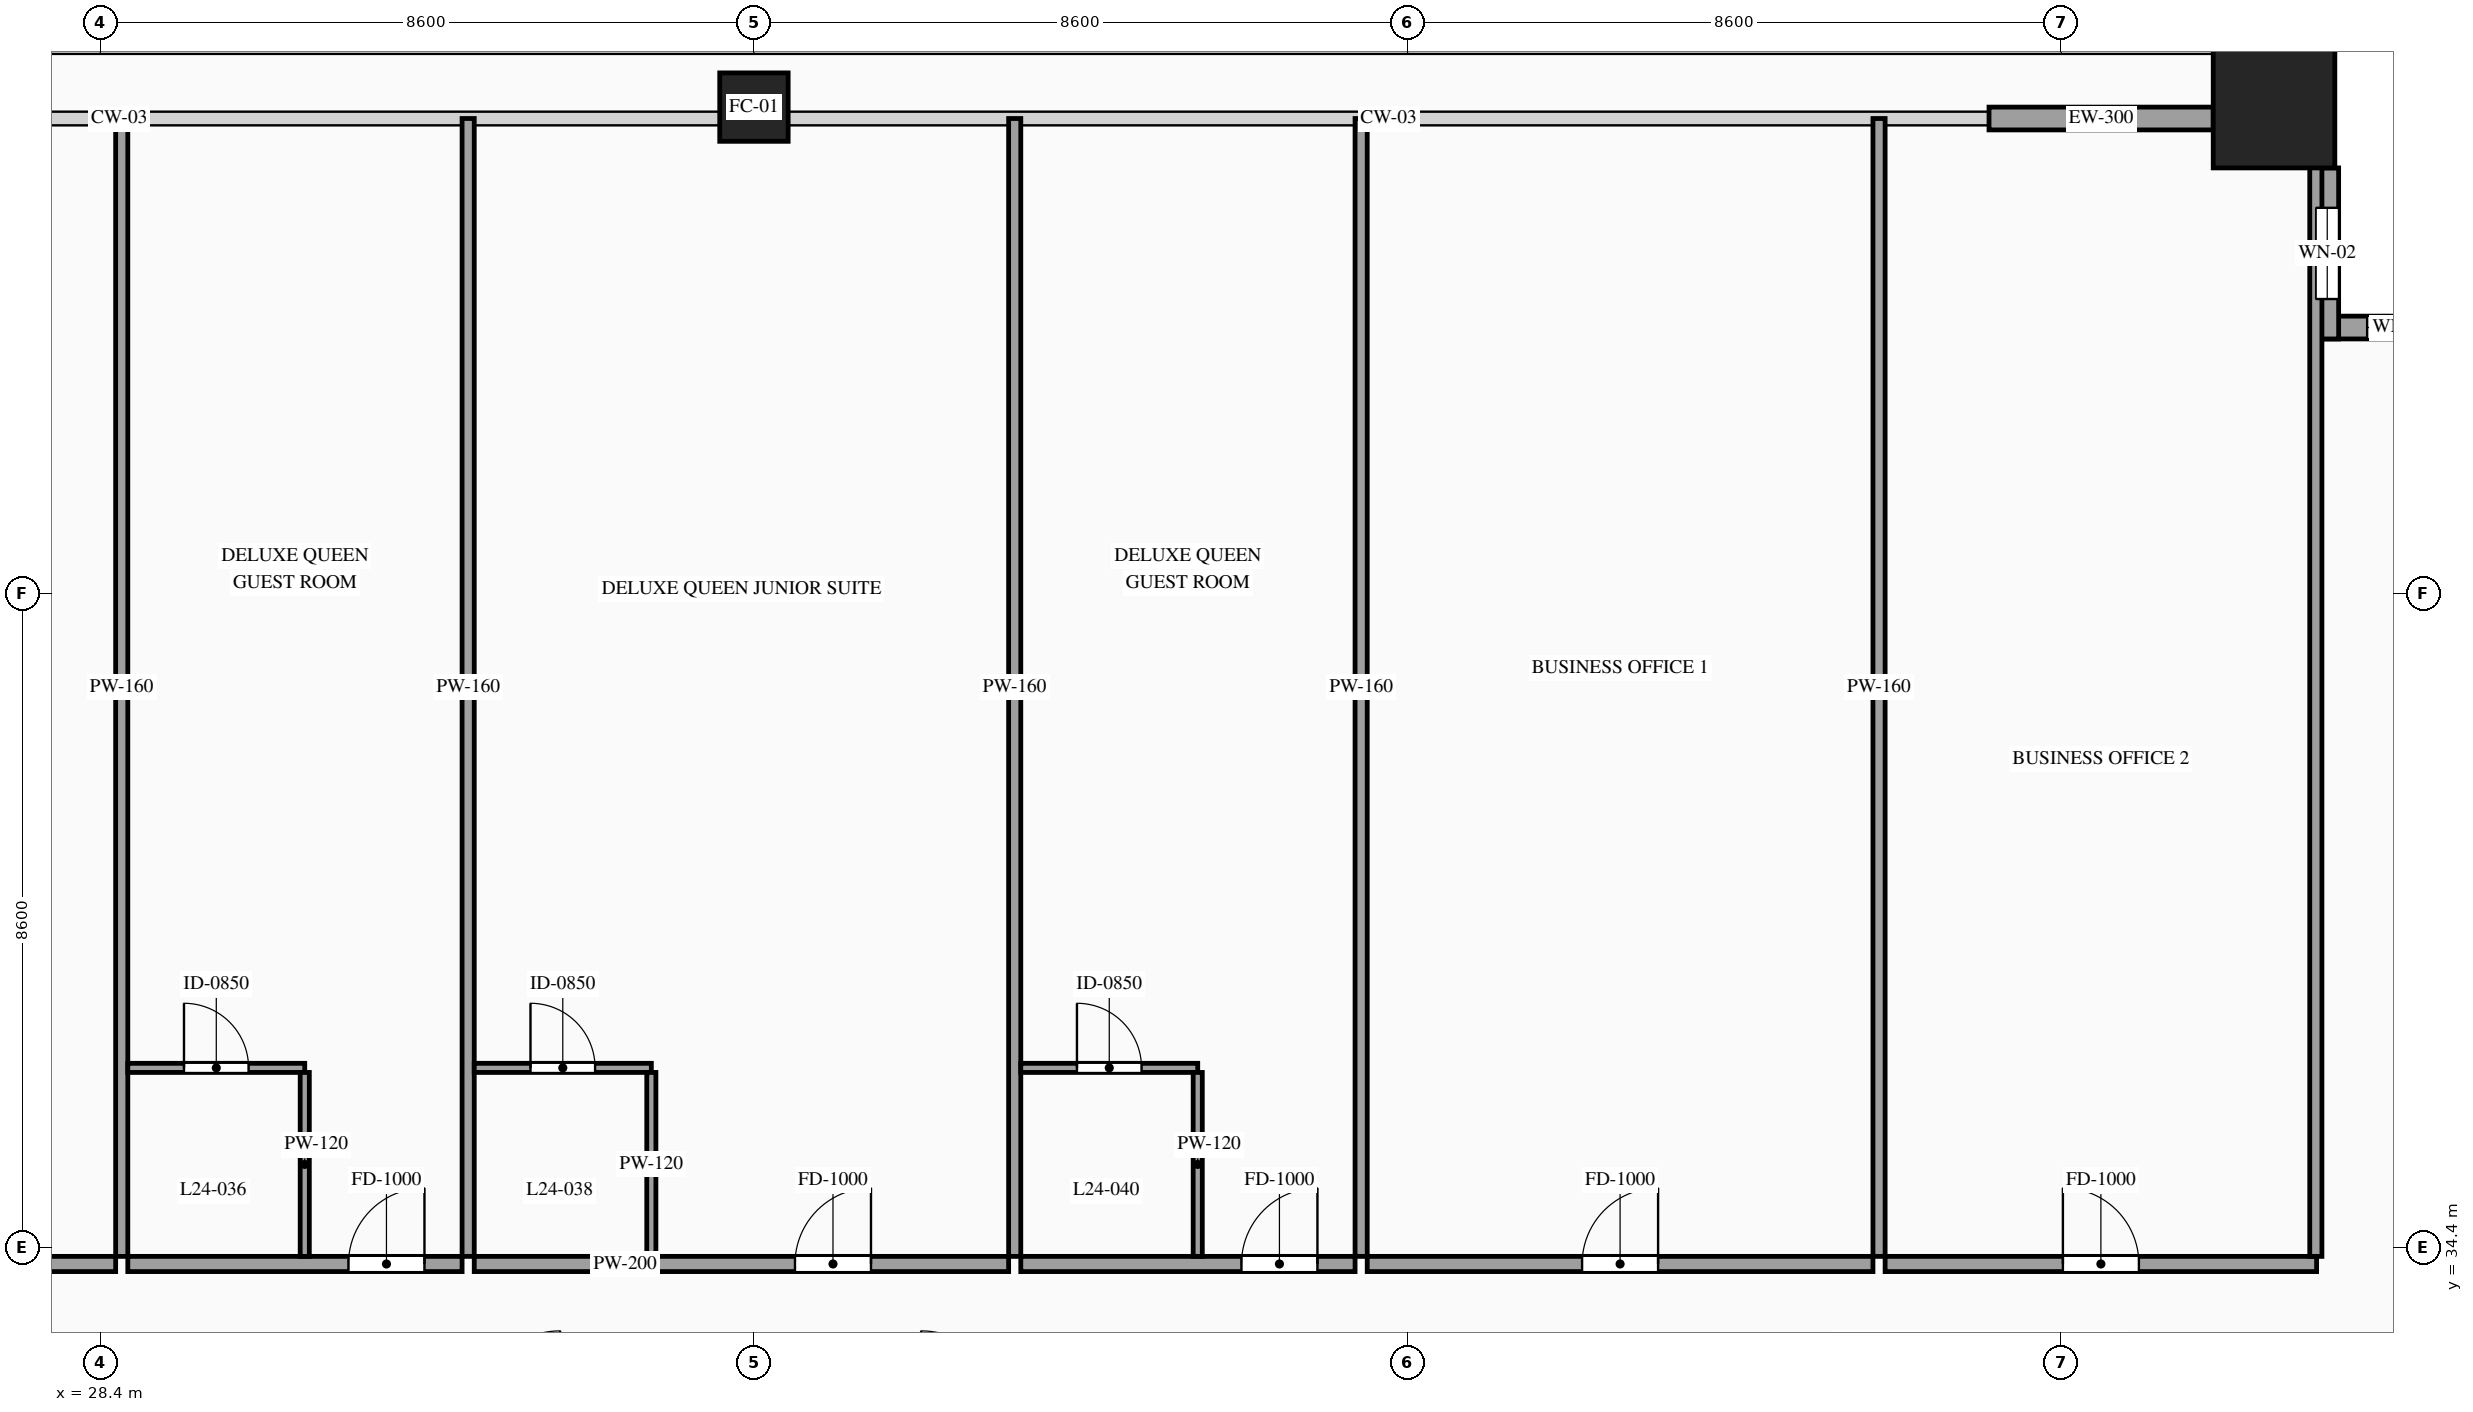
"""IFC4 building model, lengths in metres.
Left out: names, types, materials, properties, quantities, classifications, styles, units other than length and angle.
Written with IfcOpenShell. Run it as: python <this file> out.ifc"""

import sys

from ifc_helpers import new_model, si_unit, direction, frame, frame_2d, origin, origin_2d, place, context, subcontext, project, spatial, rectangle, hollow_rectangle, extrude, source, transform, mapped, element, fill, save


model = new_model("IFC4")
c1 = context("Model", 3, precision=1e-05, world=origin(), true_north=direction((0.0, 1.0)))
c2 = subcontext(c1, "Body", "Model", "MODEL_VIEW")
j1 = project(units=[si_unit("LENGTHUNIT", "METRE"), si_unit("PLANEANGLEUNIT", "RADIAN")], contexts=[c1])
p1 = place(None, origin())
s1 = spatial("IfcSite", under=j1, at=p1, CompositionType="ELEMENT")
p2 = place(p1, origin())
s2 = spatial("IfcBuilding", under=s1, at=p2, CompositionType="ELEMENT")
p3 = place(p2, frame((0.0, 0.0, 93.8)))
s3 = spatial("IfcBuildingStorey", under=s2, at=p3, CompositionType="ELEMENT", Elevation=93.8)
m1 = source(origin(), c2, "Body", "SweptSolid", [
    extrude(hollow_rectangle(XDim=0.9, YDim=0.9, WallThickness=0.042, at=origin_2d()), origin(), (0.0, 0.0, 1.0), 3.6),
])
p4 = place(p3, frame((37.0, 49.4, 0.0), z_axis=(0.0, 0.0, 1.0), x_axis=(1.0, 0.0, 0.0)))
e1 = element("IfcColumn", 1, at=p4, inside=s3, PredefinedType="COLUMN", context=c2, shape_type="MappedRepresentation", body=[
    mapped(m1, transform((0.0, 0.0, 0.0), scale=1.0)),
])
m2 = source(origin(), c2, "Body", "SweptSolid", [
    extrude(hollow_rectangle(XDim=1.6, YDim=1.6, WallThickness=0.07, at=origin_2d()), origin(), (0.0, 0.0, 1.0), 3.6),
])
p5 = place(p3, frame((57.0, 49.4, 0.0), z_axis=(0.0, 0.0, 1.0), x_axis=(1.0, 0.0, 0.0)))
e2 = element("IfcColumn", 2, at=p5, inside=s3, PredefinedType="COLUMN", context=c2, shape_type="MappedRepresentation", body=[
    mapped(m2, transform((0.0, 0.0, 0.0), scale=1.0)),
])
p6 = place(p3, frame((59.8, 46.5, 0.0), z_axis=(0.0, 0.0, 1.0), x_axis=(-1.0, 0.0, 0.0)))
e3 = element("IfcWall", 3, at=p6, inside=s3, PredefinedType="SOLIDWALL", context=c2, shape_type="SweptSolid", body=[
    extrude(rectangle(XDim=2.25, YDim=0.3, at=frame_2d((1.125, 0.0))), origin(), (0.0, 0.0, 1.0), 3.38),
])
p7 = place(p6, frame((0.675, 0.0, 0.85)))
e4 = element("IfcOpeningElement", 4, at=p7, cuts=e3, PredefinedType="OPENING", context=c2, shape_type="SweptSolid", body=[
    extrude(rectangle(XDim=0.9, YDim=1.5, at=frame_2d((0.45, 0.75))), frame((0.0, 0.165, 0.0), z_axis=(0.0, -1.0, 0.0), x_axis=(1.0, 0.0, 0.0)), (0.0, 0.0, 1.0), 0.33),
])
p8 = place(p3, frame((57.7, 46.35, 0.0), z_axis=(0.0, 0.0, 1.0), x_axis=(0.0, 1.0, 0.0)))
e5 = element("IfcWall", 5, at=p8, inside=s3, PredefinedType="SOLIDWALL", context=c2, shape_type="SweptSolid", body=[
    extrude(rectangle(XDim=2.25, YDim=0.3, at=frame_2d((1.125, 0.0))), origin(), (0.0, 0.0, 1.0), 3.38),
])
p9 = place(p8, frame((0.525, 0.0, 0.85)))
e6 = element("IfcOpeningElement", 6, at=p9, cuts=e5, PredefinedType="OPENING", context=c2, shape_type="SweptSolid", body=[
    extrude(rectangle(XDim=1.2, YDim=2.1, at=frame_2d((0.6, 1.05))), frame((0.0, 0.165, 0.0), z_axis=(0.0, -1.0, 0.0), x_axis=(1.0, 0.0, 0.0)), (0.0, 0.0, 1.0), 0.33),
])
m3 = source(origin(), c2, "Body", "SweptSolid", [
    extrude(rectangle(XDim=2.95, YDim=0.3, at=frame_2d((1.475, 0.0))), origin(), (0.0, 0.0, 1.0), 2.775),
])
p10 = place(p3, frame((53.25, 49.25, 0.0), z_axis=(0.0, 0.0, 1.0), x_axis=(1.0, 0.0, 0.0)))
e7 = element("IfcWall", 7, at=p10, inside=s3, PredefinedType="SOLIDWALL", context=c2, shape_type="MappedRepresentation", body=[
    mapped(m3, transform((0.0, 0.0, 0.0), scale=1.0)),
])
p11 = place(p3, frame((22.277, 34.18, 0.0), z_axis=(0.0, 0.0, 1.0), x_axis=(1.0, 0.0, 0.0)))
e8 = element("IfcWall", 8, at=p11, inside=s3, PredefinedType="PARTITIONING", context=c2, shape_type="SweptSolid", body=[
    extrude(rectangle(XDim=6.325, YDim=0.2, at=frame_2d((3.163, 0.0))), origin(), (0.0, 0.0, 1.0), 3.38),
])
p12 = place(p11, frame((3.868, 0.0, 0.0)))
e9 = element("IfcOpeningElement", 9, at=p12, cuts=e8, PredefinedType="OPENING", context=c2, shape_type="SweptSolid", body=[
    extrude(rectangle(XDim=1.0, YDim=2.2, at=frame_2d((0.5, 1.1))), frame((0.0, 0.115, 0.0), z_axis=(0.0, -1.0, 0.0), x_axis=(1.0, 0.0, 0.0)), (0.0, 0.0, 1.0), 0.23),
])
m4 = source(origin(), c2, "Body", "SweptSolid", [
    extrude(rectangle(XDim=14.97, YDim=0.16, at=frame_2d((7.485, 0.0))), origin(), (0.0, 0.0, 1.0), 3.38),
])
p13 = place(p3, frame((28.682, 34.28, 0.0), z_axis=(0.0, 0.0, 1.0), x_axis=(0.0, 1.0, 0.0)))
e10 = element("IfcWall", 10, at=p13, inside=s3, PredefinedType="PARTITIONING", context=c2, shape_type="MappedRepresentation", body=[
    mapped(m4, transform((0.0, 0.0, 0.0), scale=1.0)),
])
p14 = place(p3, frame((28.762, 34.18, 0.0), z_axis=(0.0, 0.0, 1.0), x_axis=(1.0, 0.0, 0.0)))
e11 = element("IfcWall", 11, at=p14, inside=s3, PredefinedType="PARTITIONING", context=c2, shape_type="SweptSolid", body=[
    extrude(rectangle(XDim=4.398, YDim=0.2, at=frame_2d((2.199, 0.0))), origin(), (0.0, 0.0, 1.0), 3.38),
])
p15 = place(p14, frame((2.903, 0.0, 0.0)))
e12 = element("IfcOpeningElement", 12, at=p15, cuts=e11, PredefinedType="OPENING", context=c2, shape_type="SweptSolid", body=[
    extrude(rectangle(XDim=1.0, YDim=2.2, at=frame_2d((0.5, 1.1))), frame((0.0, 0.115, 0.0), z_axis=(0.0, -1.0, 0.0), x_axis=(1.0, 0.0, 0.0)), (0.0, 0.0, 1.0), 0.23),
])
p16 = place(p3, frame((33.24, 34.28, 0.0), z_axis=(0.0, 0.0, 1.0), x_axis=(0.0, 1.0, 0.0)))
e13 = element("IfcWall", 13, at=p16, inside=s3, PredefinedType="PARTITIONING", context=c2, shape_type="MappedRepresentation", body=[
    mapped(m4, transform((0.0, 0.0, 0.0), scale=1.0)),
])
p17 = place(p3, frame((28.762, 36.76, 0.0), z_axis=(0.0, 0.0, 1.0), x_axis=(1.0, 0.0, 0.0)))
e14 = element("IfcWall", 14, at=p17, inside=s3, PredefinedType="PARTITIONING", context=c2, shape_type="SweptSolid", body=[
    extrude(rectangle(XDim=2.328, YDim=0.12, at=frame_2d((1.164, 0.0))), origin(), (0.0, 0.0, 1.0), 3.38),
])
p18 = place(p17, frame((0.739, 0.0, 0.0)))
e15 = element("IfcOpeningElement", 15, at=p18, cuts=e14, PredefinedType="OPENING", context=c2, shape_type="SweptSolid", body=[
    extrude(rectangle(XDim=0.85, YDim=2.1, at=frame_2d((0.425, 1.05))), frame((0.0, 0.075, 0.0), z_axis=(0.0, -1.0, 0.0), x_axis=(1.0, 0.0, 0.0)), (0.0, 0.0, 1.0), 0.15),
])
m5 = source(origin(), c2, "Body", "SweptSolid", [
    extrude(rectangle(XDim=2.42, YDim=0.12, at=frame_2d((1.21, 0.0))), origin(), (0.0, 0.0, 1.0), 3.38),
])
p19 = place(p3, frame((31.09, 34.28, 0.0), z_axis=(0.0, 0.0, 1.0), x_axis=(0.0, 1.0, 0.0)))
e16 = element("IfcWall", 16, at=p19, inside=s3, PredefinedType="PARTITIONING", context=c2, shape_type="MappedRepresentation", body=[
    mapped(m5, transform((0.0, 0.0, 0.0), scale=1.0)),
])
p20 = place(p3, frame((33.32, 34.18, 0.0), z_axis=(0.0, 0.0, 1.0), x_axis=(1.0, 0.0, 0.0)))
e17 = element("IfcWall", 17, at=p20, inside=s3, PredefinedType="PARTITIONING", context=c2, shape_type="SweptSolid", body=[
    extrude(rectangle(XDim=7.031, YDim=0.2, at=frame_2d((3.516, 0.0))), origin(), (0.0, 0.0, 1.0), 3.38),
])
p21 = place(p20, frame((4.22, 0.0, 0.0)))
e18 = element("IfcOpeningElement", 18, at=p21, cuts=e17, PredefinedType="OPENING", context=c2, shape_type="SweptSolid", body=[
    extrude(rectangle(XDim=1.0, YDim=2.2, at=frame_2d((0.5, 1.1))), frame((0.0, 0.115, 0.0), z_axis=(0.0, -1.0, 0.0), x_axis=(1.0, 0.0, 0.0)), (0.0, 0.0, 1.0), 0.23),
])
p22 = place(p3, frame((40.431, 34.28, 0.0), z_axis=(0.0, 0.0, 1.0), x_axis=(0.0, 1.0, 0.0)))
e19 = element("IfcWall", 19, at=p22, inside=s3, PredefinedType="PARTITIONING", context=c2, shape_type="MappedRepresentation", body=[
    mapped(m4, transform((0.0, 0.0, 0.0), scale=1.0)),
])
p23 = place(p3, frame((33.32, 36.76, 0.0), z_axis=(0.0, 0.0, 1.0), x_axis=(1.0, 0.0, 0.0)))
e20 = element("IfcWall", 20, at=p23, inside=s3, PredefinedType="PARTITIONING", context=c2, shape_type="SweptSolid", body=[
    extrude(rectangle(XDim=2.33, YDim=0.12, at=frame_2d((1.165, 0.0))), origin(), (0.0, 0.0, 1.0), 3.38),
])
p24 = place(p23, frame((0.74, 0.0, 0.0)))
e21 = element("IfcOpeningElement", 21, at=p24, cuts=e20, PredefinedType="OPENING", context=c2, shape_type="SweptSolid", body=[
    extrude(rectangle(XDim=0.85, YDim=2.1, at=frame_2d((0.425, 1.05))), frame((0.0, 0.075, 0.0), z_axis=(0.0, -1.0, 0.0), x_axis=(1.0, 0.0, 0.0)), (0.0, 0.0, 1.0), 0.15),
])
p25 = place(p3, frame((35.65, 34.28, 0.0), z_axis=(0.0, 0.0, 1.0), x_axis=(0.0, 1.0, 0.0)))
e22 = element("IfcWall", 22, at=p25, inside=s3, PredefinedType="PARTITIONING", context=c2, shape_type="MappedRepresentation", body=[
    mapped(m5, transform((0.0, 0.0, 0.0), scale=1.0)),
])
p26 = place(p3, frame((40.511, 34.18, 0.0), z_axis=(0.0, 0.0, 1.0), x_axis=(1.0, 0.0, 0.0)))
e23 = element("IfcWall", 23, at=p26, inside=s3, PredefinedType="PARTITIONING", context=c2, shape_type="SweptSolid", body=[
    extrude(rectangle(XDim=4.398, YDim=0.2, at=frame_2d((2.199, 0.0))), origin(), (0.0, 0.0, 1.0), 3.38),
])
p27 = place(p26, frame((2.903, 0.0, 0.0)))
e24 = element("IfcOpeningElement", 24, at=p27, cuts=e23, PredefinedType="OPENING", context=c2, shape_type="SweptSolid", body=[
    extrude(rectangle(XDim=1.0, YDim=2.2, at=frame_2d((0.5, 1.1))), frame((0.0, 0.115, 0.0), z_axis=(0.0, -1.0, 0.0), x_axis=(1.0, 0.0, 0.0)), (0.0, 0.0, 1.0), 0.23),
])
p28 = place(p3, frame((44.989, 34.28, 0.0), z_axis=(0.0, 0.0, 1.0), x_axis=(0.0, 1.0, 0.0)))
e25 = element("IfcWall", 25, at=p28, inside=s3, PredefinedType="PARTITIONING", context=c2, shape_type="MappedRepresentation", body=[
    mapped(m4, transform((0.0, 0.0, 0.0), scale=1.0)),
])
p29 = place(p3, frame((40.511, 36.76, 0.0), z_axis=(0.0, 0.0, 1.0), x_axis=(1.0, 0.0, 0.0)))
e26 = element("IfcWall", 26, at=p29, inside=s3, PredefinedType="PARTITIONING", context=c2, shape_type="SweptSolid", body=[
    extrude(rectangle(XDim=2.328, YDim=0.12, at=frame_2d((1.164, 0.0))), origin(), (0.0, 0.0, 1.0), 3.38),
])
p30 = place(p29, frame((0.739, 0.0, 0.0)))
e27 = element("IfcOpeningElement", 27, at=p30, cuts=e26, PredefinedType="OPENING", context=c2, shape_type="SweptSolid", body=[
    extrude(rectangle(XDim=0.85, YDim=2.1, at=frame_2d((0.425, 1.05))), frame((0.0, 0.075, 0.0), z_axis=(0.0, -1.0, 0.0), x_axis=(1.0, 0.0, 0.0)), (0.0, 0.0, 1.0), 0.15),
])
p31 = place(p3, frame((42.839, 34.28, 0.0), z_axis=(0.0, 0.0, 1.0), x_axis=(0.0, 1.0, 0.0)))
e28 = element("IfcWall", 28, at=p31, inside=s3, PredefinedType="PARTITIONING", context=c2, shape_type="MappedRepresentation", body=[
    mapped(m5, transform((0.0, 0.0, 0.0), scale=1.0)),
])
p32 = place(p3, frame((45.069, 34.18, 0.0), z_axis=(0.0, 0.0, 1.0), x_axis=(1.0, 0.0, 0.0)))
e29 = element("IfcWall", 29, at=p32, inside=s3, PredefinedType="PARTITIONING", context=c2, shape_type="SweptSolid", body=[
    extrude(rectangle(XDim=6.654, YDim=0.2, at=frame_2d((3.327, 0.0))), origin(), (0.0, 0.0, 1.0), 3.38),
])
p33 = place(p32, frame((2.827, 0.0, 0.0)))
e30 = element("IfcOpeningElement", 30, at=p33, cuts=e29, PredefinedType="OPENING", context=c2, shape_type="SweptSolid", body=[
    extrude(rectangle(XDim=1.0, YDim=2.2, at=frame_2d((0.5, 1.1))), frame((0.0, 0.115, 0.0), z_axis=(0.0, -1.0, 0.0), x_axis=(1.0, 0.0, 0.0)), (0.0, 0.0, 1.0), 0.23),
])
p34 = place(p3, frame((51.803, 34.28, 0.0), z_axis=(0.0, 0.0, 1.0), x_axis=(0.0, 1.0, 0.0)))
e31 = element("IfcWall", 31, at=p34, inside=s3, PredefinedType="PARTITIONING", context=c2, shape_type="MappedRepresentation", body=[
    mapped(m4, transform((0.0, 0.0, 0.0), scale=1.0)),
])
p35 = place(p3, frame((51.883, 34.18, 0.0), z_axis=(0.0, 0.0, 1.0), x_axis=(1.0, 0.0, 0.0)))
e32 = element("IfcWall", 32, at=p35, inside=s3, PredefinedType="PARTITIONING", context=c2, shape_type="SweptSolid", body=[
    extrude(rectangle(XDim=5.677, YDim=0.2, at=frame_2d((2.838, 0.0))), origin(), (0.0, 0.0, 1.0), 3.38),
])
p36 = place(p35, frame((2.339, 0.0, 0.0)))
e33 = element("IfcOpeningElement", 33, at=p36, cuts=e32, PredefinedType="OPENING", context=c2, shape_type="SweptSolid", body=[
    extrude(rectangle(XDim=1.0, YDim=2.2, at=frame_2d((0.5, 1.1))), frame((0.0, 0.115, 0.0), z_axis=(0.0, -1.0, 0.0), x_axis=(1.0, 0.0, 0.0)), (0.0, 0.0, 1.0), 0.23),
])
m6 = source(origin(), c2, "Body", "SweptSolid", [
    extrude(rectangle(XDim=14.82, YDim=0.16, at=frame_2d((7.41, 0.0))), origin(), (0.0, 0.0, 1.0), 3.38),
])
p37 = place(p3, frame((57.55, 34.28, 0.0), z_axis=(0.0, 0.0, 1.0), x_axis=(0.0, 1.0, 0.0)))
e34 = element("IfcWall", 34, at=p37, inside=s3, PredefinedType="PARTITIONING", context=c2, shape_type="MappedRepresentation", body=[
    mapped(m6, transform((0.0, 0.0, 0.0), scale=1.0)),
])
m7 = source(origin(), c2, "Body", "SweptSolid", [
    extrude(rectangle(XDim=0.9, YDim=1.5, at=frame_2d((0.45, 0.75))), frame((0.0, 0.03, 0.0), z_axis=(0.0, -1.0, 0.0), x_axis=(1.0, 0.0, 0.0)), (0.0, 0.0, 1.0), 0.06),
])
p38 = place(p7, origin())
e35 = element("IfcWindow", 35, at=p38, inside=s3, PartitioningType="SINGLE_PANEL", PredefinedType="WINDOW", context=c2, shape_type="MappedRepresentation", body=[
    mapped(m7, transform((0.0, 0.0, 0.0), scale=1.0)),
])
fill(e4, e35)
m8 = source(origin(), c2, "Body", "SweptSolid", [
    extrude(rectangle(XDim=1.2, YDim=2.1, at=frame_2d((0.6, 1.05))), frame((0.0, 0.03, 0.0), z_axis=(0.0, -1.0, 0.0), x_axis=(1.0, 0.0, 0.0)), (0.0, 0.0, 1.0), 0.06),
])
p39 = place(p9, origin())
e36 = element("IfcWindow", 36, at=p39, inside=s3, PartitioningType="SINGLE_PANEL", PredefinedType="WINDOW", context=c2, shape_type="MappedRepresentation", body=[
    mapped(m8, transform((0.0, 0.0, 0.0), scale=1.0)),
])
fill(e6, e36)
m9 = source(origin(), c2, "Body", "SweptSolid", [
    extrude(rectangle(XDim=1.0, YDim=2.2, at=frame_2d((0.5, 1.1))), frame((0.0, 0.025, 0.0), z_axis=(0.0, -1.0, 0.0), x_axis=(1.0, 0.0, 0.0)), (0.0, 0.0, 1.0), 0.05),
])
p40 = place(p15, origin())
e37 = element("IfcDoor", 37, at=p40, inside=s3, OperationType="SINGLE_SWING_RIGHT", PredefinedType="DOOR", context=c2, shape_type="MappedRepresentation", body=[
    mapped(m9, transform((0.0, 0.0, 0.0), scale=1.0)),
])
fill(e12, e37)
m10 = source(origin(), c2, "Body", "SweptSolid", [
    extrude(rectangle(XDim=0.85, YDim=2.1, at=frame_2d((0.425, 1.05))), frame((0.0, 0.025, 0.0), z_axis=(0.0, -1.0, 0.0), x_axis=(1.0, 0.0, 0.0)), (0.0, 0.0, 1.0), 0.05),
])
p41 = place(p18, origin())
e38 = element("IfcDoor", 38, at=p41, inside=s3, OperationType="SINGLE_SWING_LEFT", PredefinedType="DOOR", context=c2, shape_type="MappedRepresentation", body=[
    mapped(m10, transform((0.0, 0.0, 0.0), scale=1.0)),
])
fill(e15, e38)
p42 = place(p21, origin())
e39 = element("IfcDoor", 39, at=p42, inside=s3, OperationType="SINGLE_SWING_RIGHT", PredefinedType="DOOR", context=c2, shape_type="MappedRepresentation", body=[
    mapped(m9, transform((0.0, 0.0, 0.0), scale=1.0)),
])
fill(e18, e39)
p43 = place(p24, origin())
e40 = element("IfcDoor", 40, at=p43, inside=s3, OperationType="SINGLE_SWING_LEFT", PredefinedType="DOOR", context=c2, shape_type="MappedRepresentation", body=[
    mapped(m10, transform((0.0, 0.0, 0.0), scale=1.0)),
])
fill(e21, e40)
p44 = place(p27, origin())
e41 = element("IfcDoor", 41, at=p44, inside=s3, OperationType="SINGLE_SWING_RIGHT", PredefinedType="DOOR", context=c2, shape_type="MappedRepresentation", body=[
    mapped(m9, transform((0.0, 0.0, 0.0), scale=1.0)),
])
fill(e24, e41)
p45 = place(p30, origin())
e42 = element("IfcDoor", 42, at=p45, inside=s3, OperationType="SINGLE_SWING_LEFT", PredefinedType="DOOR", context=c2, shape_type="MappedRepresentation", body=[
    mapped(m10, transform((0.0, 0.0, 0.0), scale=1.0)),
])
fill(e27, e42)
p46 = place(p33, origin())
e43 = element("IfcDoor", 43, at=p46, inside=s3, OperationType="SINGLE_SWING_RIGHT", PredefinedType="DOOR", context=c2, shape_type="MappedRepresentation", body=[
    mapped(m9, transform((0.0, 0.0, 0.0), scale=1.0)),
])
fill(e30, e43)
p47 = place(p36, origin())
e44 = element("IfcDoor", 44, at=p47, inside=s3, OperationType="SINGLE_SWING_LEFT", PredefinedType="DOOR", context=c2, shape_type="MappedRepresentation", body=[
    mapped(m9, transform((0.0, 0.0, 0.0), scale=1.0)),
])
fill(e33, e44)
save(model, sys.argv[1])
